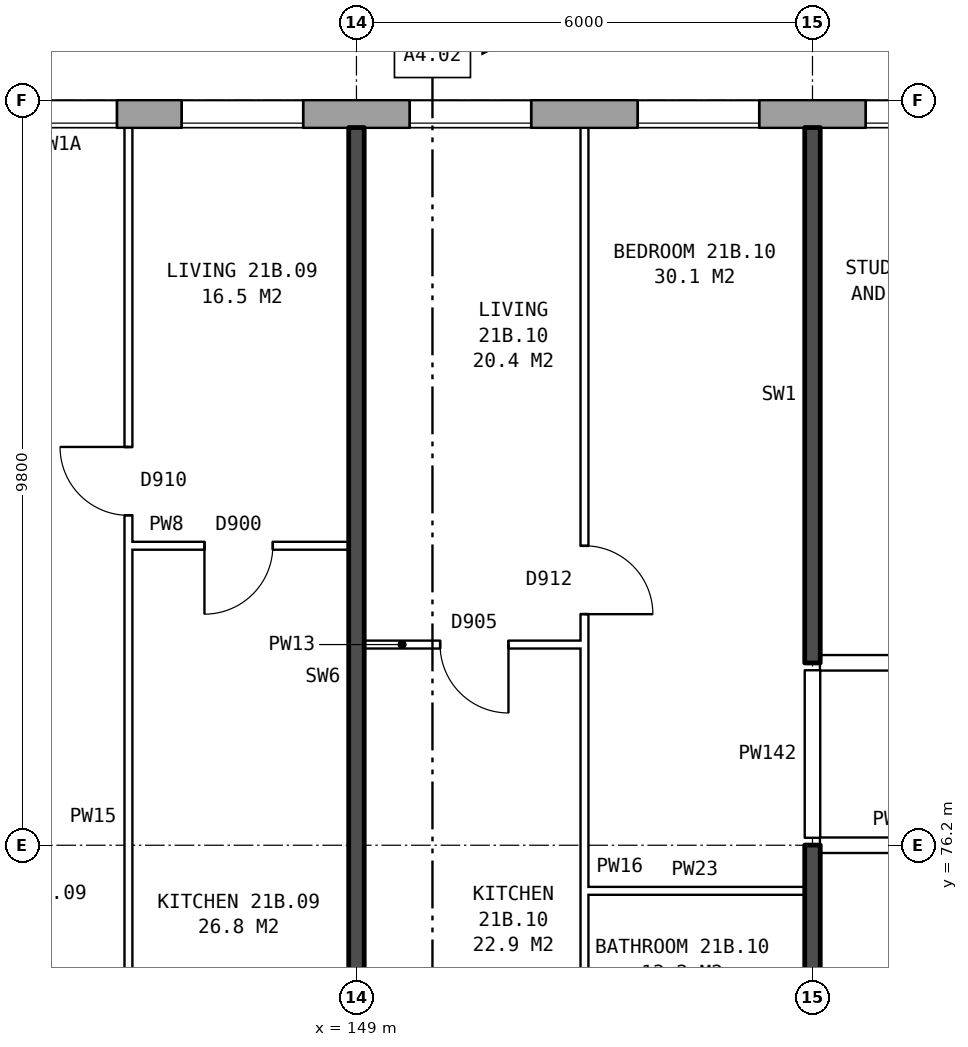
"""IFC4 building model, lengths in metres.
Left out: names, types, materials, properties, quantities, classifications, styles, units other than length and angle.
Written with IfcOpenShell. Run it as: python <this file> out.ifc"""

import sys

from ifc_helpers import new_model, si_unit, direction, frame, frame_2d, origin, place, context, subcontext, project, spatial, rectangle, extrude, element, fill, save


model = new_model("IFC4")
c1 = context("Model", 3, precision=1e-05, world=origin(), true_north=direction((0.0, 1.0)))
c2 = subcontext(c1, "Body", "Model", "MODEL_VIEW")
j1 = project(units=[si_unit("LENGTHUNIT", "METRE"), si_unit("PLANEANGLEUNIT", "RADIAN")], contexts=[c1])
p1 = place(None, origin())
s1 = spatial("IfcSite", under=j1, at=p1, CompositionType="ELEMENT")
p2 = place(p1, origin())
s2 = spatial("IfcBuilding", under=s1, at=p2, CompositionType="ELEMENT")
p3 = place(p2, frame((0.0, 0.0, 77.8)))
s3 = spatial("IfcBuildingStorey", under=s2, at=p3, CompositionType="ELEMENT", Elevation=77.8)
p4 = place(p3, frame((172.175, 85.82, 0.0), z_axis=(0.0, 0.0, 1.0), x_axis=(-1.0, 0.0, 0.0)))
e1 = element("IfcWall", 1, at=p4, inside=s3, PredefinedType="STANDARD", context=c2, shape_type="SweptSolid", body=[
    extrude(rectangle(XDim=38.101, YDim=0.36, at=frame_2d((19.05, 0.0))), origin(), (0.0, 0.0, 1.0), 2.85),
])
p5 = place(p4, frame((2.875, 0.0, 0.8)))
e2 = element("IfcOpeningElement", 2, at=p5, cuts=e1, PredefinedType="OPENING", context=c2, shape_type="SweptSolid", body=[
    extrude(rectangle(XDim=1.6, YDim=1.8, at=frame_2d((0.8, 0.9))), frame((0.0, 0.19, 0.0), z_axis=(0.0, -1.0, 0.0), x_axis=(1.0, 0.0, 0.0)), (0.0, 0.0, 1.0), 0.38),
])
p6 = place(p4, frame((5.875, 0.0, 0.8)))
e3 = element("IfcOpeningElement", 3, at=p6, cuts=e1, PredefinedType="OPENING", context=c2, shape_type="SweptSolid", body=[
    extrude(rectangle(XDim=1.6, YDim=1.8, at=frame_2d((0.8, 0.9))), frame((0.0, 0.19, 0.0), z_axis=(0.0, -1.0, 0.0), x_axis=(1.0, 0.0, 0.0)), (0.0, 0.0, 1.0), 0.38),
])
p7 = place(p4, frame((7.775, 0.0, 1.7)))
e4 = element("IfcOpeningElement", 4, at=p7, cuts=e1, PredefinedType="OPENING", context=c2, shape_type="SweptSolid", body=[
    extrude(rectangle(XDim=0.6, YDim=0.9, at=frame_2d((0.3, 0.45))), frame((0.0, 0.19, 0.0), z_axis=(0.0, -1.0, 0.0), x_axis=(1.0, 0.0, 0.0)), (0.0, 0.0, 1.0), 0.38),
])
p8 = place(p4, frame((11.875, 0.0, 0.8)))
e5 = element("IfcOpeningElement", 5, at=p8, cuts=e1, PredefinedType="OPENING", context=c2, shape_type="SweptSolid", body=[
    extrude(rectangle(XDim=1.6, YDim=1.8, at=frame_2d((0.8, 0.9))), frame((0.0, 0.19, 0.0), z_axis=(0.0, -1.0, 0.0), x_axis=(1.0, 0.0, 0.0)), (0.0, 0.0, 1.0), 0.38),
])
p9 = place(p4, frame((14.875, 0.0, 0.8)))
e6 = element("IfcOpeningElement", 6, at=p9, cuts=e1, PredefinedType="OPENING", context=c2, shape_type="SweptSolid", body=[
    extrude(rectangle(XDim=1.6, YDim=1.8, at=frame_2d((0.8, 0.9))), frame((0.0, 0.19, 0.0), z_axis=(0.0, -1.0, 0.0), x_axis=(1.0, 0.0, 0.0)), (0.0, 0.0, 1.0), 0.38),
])
p10 = place(p4, frame((17.875, 0.0, 0.8)))
e7 = element("IfcOpeningElement", 7, at=p10, cuts=e1, PredefinedType="OPENING", context=c2, shape_type="SweptSolid", body=[
    extrude(rectangle(XDim=1.6, YDim=1.8, at=frame_2d((0.8, 0.9))), frame((0.0, 0.19, 0.0), z_axis=(0.0, -1.0, 0.0), x_axis=(1.0, 0.0, 0.0)), (0.0, 0.0, 1.0), 0.38),
])
p11 = place(p4, frame((20.875, 0.0, 0.8)))
e8 = element("IfcOpeningElement", 8, at=p11, cuts=e1, PredefinedType="OPENING", context=c2, shape_type="SweptSolid", body=[
    extrude(rectangle(XDim=1.6, YDim=1.8, at=frame_2d((0.8, 0.9))), frame((0.0, 0.19, 0.0), z_axis=(0.0, -1.0, 0.0), x_axis=(1.0, 0.0, 0.0)), (0.0, 0.0, 1.0), 0.38),
])
p12 = place(p4, frame((23.875, 0.0, 0.8)))
e9 = element("IfcOpeningElement", 9, at=p12, cuts=e1, PredefinedType="OPENING", context=c2, shape_type="SweptSolid", body=[
    extrude(rectangle(XDim=1.6, YDim=1.8, at=frame_2d((0.8, 0.9))), frame((0.0, 0.19, 0.0), z_axis=(0.0, -1.0, 0.0), x_axis=(1.0, 0.0, 0.0)), (0.0, 0.0, 1.0), 0.38),
])
p13 = place(p4, frame((26.325, 0.0, 0.65)))
e10 = element("IfcOpeningElement", 10, at=p13, cuts=e1, PredefinedType="OPENING", context=c2, shape_type="SweptSolid", body=[
    extrude(rectangle(XDim=1.4, YDim=1.8, at=frame_2d((0.7, 0.9))), frame((0.0, 0.19, 0.0), z_axis=(0.0, -1.0, 0.0), x_axis=(1.0, 0.0, 0.0)), (0.0, 0.0, 1.0), 0.38),
])
p14 = place(p4, frame((29.675, 0.0, 1.7)))
e11 = element("IfcOpeningElement", 11, at=p14, cuts=e1, PredefinedType="OPENING", context=c2, shape_type="SweptSolid", body=[
    extrude(rectangle(XDim=0.8, YDim=0.9, at=frame_2d((0.4, 0.45))), frame((0.0, 0.19, 0.0), z_axis=(0.0, -1.0, 0.0), x_axis=(1.0, 0.0, 0.0)), (0.0, 0.0, 1.0), 0.38),
])
p15 = place(p4, frame((32.875, 0.0, 0.8)))
e12 = element("IfcOpeningElement", 12, at=p15, cuts=e1, PredefinedType="OPENING", context=c2, shape_type="SweptSolid", body=[
    extrude(rectangle(XDim=1.6, YDim=1.8, at=frame_2d((0.8, 0.9))), frame((0.0, 0.19, 0.0), z_axis=(0.0, -1.0, 0.0), x_axis=(1.0, 0.0, 0.0)), (0.0, 0.0, 1.0), 0.38),
])
p16 = place(p4, frame((35.875, 0.0, 0.8)))
e13 = element("IfcOpeningElement", 13, at=p16, cuts=e1, PredefinedType="OPENING", context=c2, shape_type="SweptSolid", body=[
    extrude(rectangle(XDim=1.6, YDim=1.8, at=frame_2d((0.8, 0.9))), frame((0.0, 0.19, 0.0), z_axis=(0.0, -1.0, 0.0), x_axis=(1.0, 0.0, 0.0)), (0.0, 0.0, 1.0), 0.38),
])
p17 = place(p4, frame((9.575, 0.0, 0.8)))
e14 = element("IfcOpeningElement", 14, at=p17, cuts=e1, PredefinedType="OPENING", context=c2, shape_type="SweptSolid", body=[
    extrude(rectangle(XDim=1.4, YDim=0.9, at=frame_2d((0.7, 0.45))), frame((0.0, 0.19, 0.0), z_axis=(0.0, -1.0, 0.0), x_axis=(1.0, 0.0, 0.0)), (0.0, 0.0, 1.0), 0.38),
])
p18 = place(p4, frame((28.025, 0.0, 0.65)))
e15 = element("IfcOpeningElement", 15, at=p18, cuts=e1, PredefinedType="OPENING", context=c2, shape_type="SweptSolid", body=[
    extrude(rectangle(XDim=0.6, YDim=0.9, at=frame_2d((0.3, 0.45))), frame((0.0, 0.19, 0.0), z_axis=(0.0, -1.0, 0.0), x_axis=(1.0, 0.0, 0.0)), (0.0, 0.0, 1.0), 0.38),
])
p19 = place(p4, frame((30.775, 0.0, 0.8)))
e16 = element("IfcOpeningElement", 16, at=p19, cuts=e1, PredefinedType="OPENING", context=c2, shape_type="SweptSolid", body=[
    extrude(rectangle(XDim=1.6, YDim=1.8, at=frame_2d((0.8, 0.9))), frame((0.0, 0.19, 0.0), z_axis=(0.0, -1.0, 0.0), x_axis=(1.0, 0.0, 0.0)), (0.0, 0.0, 1.0), 0.38),
])
p20 = place(p3, frame((152.0, 75.6, 0.0), z_axis=(0.0, 0.0, 1.0), x_axis=(1.0, 0.0, 0.0)))
e17 = element("IfcWall", 17, at=p20, inside=s3, PredefinedType="PARTITIONING", context=c2, shape_type="SweptSolid", body=[
    extrude(rectangle(XDim=2.9, YDim=0.1, at=frame_2d((1.45, 0.0))), origin(), (0.0, 0.0, 1.0), 2.85),
])
p21 = place(p3, frame((155.1, 76.2, 0.0), z_axis=(0.0, 0.0, 1.0), x_axis=(1.0, 0.0, 0.0)))
e18 = element("IfcWall", 18, at=p21, inside=s3, PredefinedType="PARTITIONING", context=c2, shape_type="SweptSolid", body=[
    extrude(rectangle(XDim=2.14, YDim=0.2, at=frame_2d((1.07, 0.0))), origin(), (0.0, 0.0, 1.0), 2.85),
])
p22 = place(p3, frame((155.1, 78.6, 0.0), z_axis=(0.0, 0.0, 1.0), x_axis=(1.0, 0.0, 0.0)))
e19 = element("IfcWall", 19, at=p22, inside=s3, PredefinedType="PARTITIONING", context=c2, shape_type="SweptSolid", body=[
    extrude(rectangle(XDim=19.79, YDim=0.2, at=frame_2d((9.895, 0.0))), origin(), (0.0, 0.0, 1.0), 2.85),
])
p23 = place(p22, frame((1.45, 0.0, 0.0)))
e20 = element("IfcOpeningElement", 20, at=p23, cuts=e19, PredefinedType="OPENING", context=c2, shape_type="SweptSolid", body=[
    extrude(rectangle(XDim=1.0, YDim=2.1, at=frame_2d((0.5, 1.05))), frame((0.0, 0.11, 0.0), z_axis=(0.0, -1.0, 0.0), x_axis=(1.0, 0.0, 0.0)), (0.0, 0.0, 1.0), 0.22),
])
p24 = place(p22, frame((9.6, 0.0, 0.0)))
e21 = element("IfcOpeningElement", 21, at=p24, cuts=e19, PredefinedType="OPENING", context=c2, shape_type="SweptSolid", body=[
    extrude(rectangle(XDim=1.0, YDim=2.1, at=frame_2d((0.5, 1.05))), frame((0.0, 0.11, 0.0), z_axis=(0.0, -1.0, 0.0), x_axis=(1.0, 0.0, 0.0)), (0.0, 0.0, 1.0), 0.22),
])
p25 = place(p22, frame((13.2, 0.0, 0.0)))
e22 = element("IfcOpeningElement", 22, at=p25, cuts=e19, PredefinedType="OPENING", context=c2, shape_type="SweptSolid", body=[
    extrude(rectangle(XDim=1.0, YDim=2.1, at=frame_2d((0.5, 1.05))), frame((0.0, 0.11, 0.0), z_axis=(0.0, -1.0, 0.0), x_axis=(1.0, 0.0, 0.0)), (0.0, 0.0, 1.0), 0.22),
])
p26 = place(p3, frame((149.1, 78.84, 0.0), z_axis=(0.0, 0.0, 1.0), x_axis=(1.0, 0.0, 0.0)))
e23 = element("IfcWall", 23, at=p26, inside=s3, PredefinedType="PARTITIONING", context=c2, shape_type="SweptSolid", body=[
    extrude(rectangle(XDim=2.9, YDim=0.1, at=frame_2d((1.45, 0.0))), origin(), (0.0, 0.0, 1.0), 2.85),
])
p27 = place(p26, frame((1.0, 0.0, 0.0)))
e24 = element("IfcOpeningElement", 24, at=p27, cuts=e23, PredefinedType="OPENING", context=c2, shape_type="SweptSolid", body=[
    extrude(rectangle(XDim=0.9, YDim=2.1, at=frame_2d((0.45, 1.05))), frame((0.0, 0.06, 0.0), z_axis=(0.0, -1.0, 0.0), x_axis=(1.0, 0.0, 0.0)), (0.0, 0.0, 1.0), 0.12),
])
p28 = place(p3, frame((146.0, 80.14, 0.0), z_axis=(0.0, 0.0, 1.0), x_axis=(1.0, 0.0, 0.0)))
e25 = element("IfcWall", 25, at=p28, inside=s3, PredefinedType="PARTITIONING", context=c2, shape_type="SweptSolid", body=[
    extrude(rectangle(XDim=2.9, YDim=0.1, at=frame_2d((1.45, 0.0))), origin(), (0.0, 0.0, 1.0), 2.85),
])
p29 = place(p28, frame((1.0, 0.0, 0.0)))
e26 = element("IfcOpeningElement", 26, at=p29, cuts=e25, PredefinedType="OPENING", context=c2, shape_type="SweptSolid", body=[
    extrude(rectangle(XDim=0.9, YDim=2.1, at=frame_2d((0.45, 1.05))), frame((0.0, 0.06, 0.0), z_axis=(0.0, -1.0, 0.0), x_axis=(1.0, 0.0, 0.0)), (0.0, 0.0, 1.0), 0.12),
])
p30 = place(p3, frame((146.0, 71.3, 0.0), z_axis=(0.0, 0.0, 1.0), x_axis=(0.0, 1.0, 0.0)))
e27 = element("IfcWall", 27, at=p30, inside=s3, PredefinedType="PARTITIONING", context=c2, shape_type="SweptSolid", body=[
    extrude(rectangle(XDim=14.34, YDim=0.1, at=frame_2d((7.17, 0.0))), origin(), (0.0, 0.0, 1.0), 2.85),
])
p31 = place(p30, frame((9.24, 0.0, 0.0)))
e28 = element("IfcOpeningElement", 28, at=p31, cuts=e27, PredefinedType="OPENING", context=c2, shape_type="SweptSolid", body=[
    extrude(rectangle(XDim=0.9, YDim=2.1, at=frame_2d((0.45, 1.05))), frame((0.0, 0.06, 0.0), z_axis=(0.0, -1.0, 0.0), x_axis=(1.0, 0.0, 0.0)), (0.0, 0.0, 1.0), 0.12),
])
p32 = place(p30, frame((0.4, 0.0, 0.0)))
e29 = element("IfcOpeningElement", 29, at=p32, cuts=e27, PredefinedType="OPENING", context=c2, shape_type="SweptSolid", body=[
    extrude(rectangle(XDim=0.9, YDim=2.1, at=frame_2d((0.45, 1.05))), frame((0.0, 0.06, 0.0), z_axis=(0.0, -1.0, 0.0), x_axis=(1.0, 0.0, 0.0)), (0.0, 0.0, 1.0), 0.12),
])
p33 = place(p3, frame((149.0, 71.2, 0.0), z_axis=(0.0, 0.0, 1.0), x_axis=(0.0, 1.0, 0.0)))
e30 = element("IfcWall", 30, at=p33, inside=s3, PredefinedType="SOLIDWALL", context=c2, shape_type="SweptSolid", body=[
    extrude(rectangle(XDim=14.44, YDim=0.2, at=frame_2d((7.22, 0.0))), origin(), (0.0, 0.0, 1.0), 2.85),
])
p34 = place(p3, frame((152.0, 71.3, 0.0), z_axis=(0.0, 0.0, 1.0), x_axis=(0.0, 1.0, 0.0)))
e31 = element("IfcWall", 31, at=p34, inside=s3, PredefinedType="PARTITIONING", context=c2, shape_type="SweptSolid", body=[
    extrude(rectangle(XDim=14.34, YDim=0.1, at=frame_2d((7.17, 0.0))), origin(), (0.0, 0.0, 1.0), 2.85),
])
p35 = place(p34, frame((7.94, 0.0, 0.0)))
e32 = element("IfcOpeningElement", 32, at=p35, cuts=e31, PredefinedType="OPENING", context=c2, shape_type="SweptSolid", body=[
    extrude(rectangle(XDim=0.9, YDim=2.1, at=frame_2d((0.45, 1.05))), frame((0.0, 0.06, 0.0), z_axis=(0.0, -1.0, 0.0), x_axis=(1.0, 0.0, 0.0)), (0.0, 0.0, 1.0), 0.12),
])
p36 = place(p34, frame((0.4, 0.0, 0.0)))
e33 = element("IfcOpeningElement", 33, at=p36, cuts=e31, PredefinedType="OPENING", context=c2, shape_type="SweptSolid", body=[
    extrude(rectangle(XDim=0.9, YDim=2.1, at=frame_2d((0.45, 1.05))), frame((0.0, 0.06, 0.0), z_axis=(0.0, -1.0, 0.0), x_axis=(1.0, 0.0, 0.0)), (0.0, 0.0, 1.0), 0.12),
])
p37 = place(p3, frame((155.0, 71.2, 0.0), z_axis=(0.0, 0.0, 1.0), x_axis=(0.0, 1.0, 0.0)))
e34 = element("IfcWall", 34, at=p37, inside=s3, PredefinedType="SOLIDWALL", context=c2, shape_type="SweptSolid", body=[
    extrude(rectangle(XDim=5.0, YDim=0.2, at=frame_2d((2.5, 0.0))), origin(), (0.0, 0.0, 1.0), 2.85),
])
p38 = place(p3, frame((155.0, 76.3, 0.0), z_axis=(0.0, 0.0, 1.0), x_axis=(0.0, 1.0, 0.0)))
e35 = element("IfcWall", 35, at=p38, inside=s3, PredefinedType="PARTITIONING", context=c2, shape_type="SweptSolid", body=[
    extrude(rectangle(XDim=2.2, YDim=0.2, at=frame_2d((1.1, 0.0))), origin(), (0.0, 0.0, 1.0), 2.85),
])
p39 = place(p3, frame((155.0, 78.6, 0.0), z_axis=(0.0, 0.0, 1.0), x_axis=(0.0, 1.0, 0.0)))
e36 = element("IfcWall", 36, at=p39, inside=s3, PredefinedType="SOLIDWALL", context=c2, shape_type="SweptSolid", body=[
    extrude(rectangle(XDim=7.04, YDim=0.2, at=frame_2d((3.52, 0.0))), origin(), (0.0, 0.0, 1.0), 2.85),
])
p40 = place(p9, origin())
e37 = element("IfcWindow", 37, at=p40, inside=s3, PartitioningType="SINGLE_PANEL", PredefinedType="WINDOW", context=c2, shape_type="SweptSolid", body=[
    extrude(rectangle(XDim=1.6, YDim=1.8, at=frame_2d((0.8, 0.9))), frame((0.0, 0.15, 0.0), z_axis=(0.0, -1.0, 0.0), x_axis=(1.0, 0.0, 0.0)), (0.0, 0.0, 1.0), 0.06),
])
fill(e6, e37)
p41 = place(p10, origin())
e38 = element("IfcWindow", 38, at=p41, inside=s3, PartitioningType="SINGLE_PANEL", PredefinedType="WINDOW", context=c2, shape_type="SweptSolid", body=[
    extrude(rectangle(XDim=1.6, YDim=1.8, at=frame_2d((0.8, 0.9))), frame((0.0, 0.15, 0.0), z_axis=(0.0, -1.0, 0.0), x_axis=(1.0, 0.0, 0.0)), (0.0, 0.0, 1.0), 0.06),
])
fill(e7, e38)
p42 = place(p11, origin())
e39 = element("IfcWindow", 39, at=p42, inside=s3, PartitioningType="SINGLE_PANEL", PredefinedType="WINDOW", context=c2, shape_type="SweptSolid", body=[
    extrude(rectangle(XDim=1.6, YDim=1.8, at=frame_2d((0.8, 0.9))), frame((0.0, 0.15, 0.0), z_axis=(0.0, -1.0, 0.0), x_axis=(1.0, 0.0, 0.0)), (0.0, 0.0, 1.0), 0.06),
])
fill(e8, e39)
p43 = place(p12, origin())
e40 = element("IfcWindow", 40, at=p43, inside=s3, PartitioningType="SINGLE_PANEL", PredefinedType="WINDOW", context=c2, shape_type="SweptSolid", body=[
    extrude(rectangle(XDim=1.6, YDim=1.8, at=frame_2d((0.8, 0.9))), frame((0.0, 0.15, 0.0), z_axis=(0.0, -1.0, 0.0), x_axis=(1.0, 0.0, 0.0)), (0.0, 0.0, 1.0), 0.06),
])
fill(e9, e40)
p44 = place(p13, origin())
e41 = element("IfcWindow", 41, at=p44, inside=s3, PartitioningType="SINGLE_PANEL", PredefinedType="WINDOW", context=c2, shape_type="SweptSolid", body=[
    extrude(rectangle(XDim=1.4, YDim=1.8, at=frame_2d((0.7, 0.9))), frame((0.0, 0.15, 0.0), z_axis=(0.0, -1.0, 0.0), x_axis=(1.0, 0.0, 0.0)), (0.0, 0.0, 1.0), 0.06),
])
fill(e10, e41)
p45 = place(p31, origin())
e42 = element("IfcDoor", 42, at=p45, inside=s3, OperationType="SINGLE_SWING_RIGHT", PredefinedType="DOOR", context=c2, shape_type="SweptSolid", body=[
    extrude(rectangle(XDim=0.9, YDim=2.1, at=frame_2d((0.45, 1.05))), frame((0.0, 0.025, 0.0), z_axis=(0.0, -1.0, 0.0), x_axis=(1.0, 0.0, 0.0)), (0.0, 0.0, 1.0), 0.05),
])
fill(e28, e42)
p46 = place(p29, frame((0.9, 0.0, 0.0), z_axis=(0.0, 0.0, 1.0), x_axis=(-1.0, 0.0, 0.0)))
e43 = element("IfcDoor", 43, at=p46, inside=s3, OperationType="SINGLE_SWING_RIGHT", PredefinedType="DOOR", context=c2, shape_type="SweptSolid", body=[
    extrude(rectangle(XDim=0.9, YDim=2.1, at=frame_2d((0.45, 1.05))), frame((0.0, 0.025, 0.0), z_axis=(0.0, -1.0, 0.0), x_axis=(1.0, 0.0, 0.0)), (0.0, 0.0, 1.0), 0.05),
])
fill(e26, e43)
p47 = place(p35, frame((0.9, 0.0, 0.0), z_axis=(0.0, 0.0, 1.0), x_axis=(-1.0, 0.0, 0.0)))
e44 = element("IfcDoor", 44, at=p47, inside=s3, OperationType="SINGLE_SWING_RIGHT", PredefinedType="DOOR", context=c2, shape_type="SweptSolid", body=[
    extrude(rectangle(XDim=0.9, YDim=2.1, at=frame_2d((0.45, 1.05))), frame((0.0, 0.025, 0.0), z_axis=(0.0, -1.0, 0.0), x_axis=(1.0, 0.0, 0.0)), (0.0, 0.0, 1.0), 0.05),
])
fill(e32, e44)
p48 = place(p27, frame((0.9, 0.0, 0.0), z_axis=(0.0, 0.0, 1.0), x_axis=(-1.0, 0.0, 0.0)))
e45 = element("IfcDoor", 45, at=p48, inside=s3, OperationType="SINGLE_SWING_LEFT", PredefinedType="DOOR", context=c2, shape_type="SweptSolid", body=[
    extrude(rectangle(XDim=0.9, YDim=2.1, at=frame_2d((0.45, 1.05))), frame((0.0, 0.025, 0.0), z_axis=(0.0, -1.0, 0.0), x_axis=(1.0, 0.0, 0.0)), (0.0, 0.0, 1.0), 0.05),
])
fill(e24, e45)
save(model, sys.argv[1])
